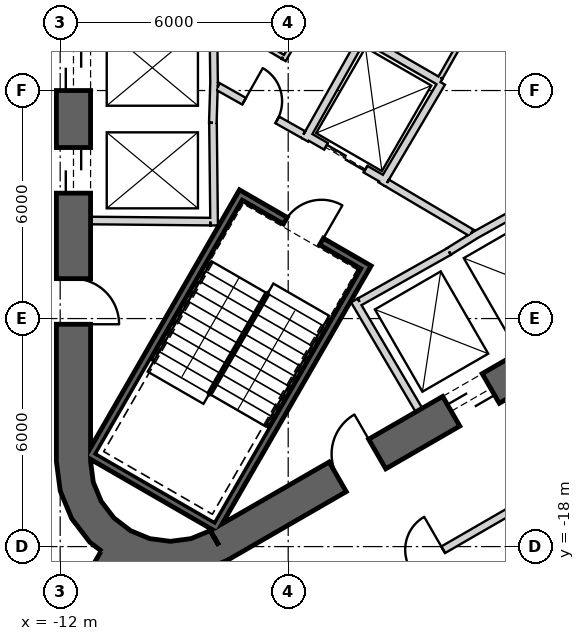
"""IFC4 building model, lengths in metres.
Left out: names, types, materials, properties, quantities, classifications, styles, units other than length and angle.
Written with IfcOpenShell. Run it as: python <this file> out.ifc"""

import sys

from ifc_helpers import new_model, si_unit, direction, frame, frame_2d, origin, place, context, subcontext, project, spatial, polyline, rectangle, outline, extrude, element, fill, save


model = new_model("IFC4")
c1 = context("Model", 3, precision=1e-05, world=origin(), true_north=direction((0.0, 1.0)))
c2 = subcontext(c1, "Body", "Model", "MODEL_VIEW")
j1 = project(units=[si_unit("LENGTHUNIT", "METRE"), si_unit("PLANEANGLEUNIT", "RADIAN")], contexts=[c1])
p1 = place(None, origin())
s1 = spatial("IfcSite", under=j1, at=p1, CompositionType="ELEMENT")
p2 = place(p1, origin())
s2 = spatial("IfcBuilding", under=s1, at=p2, CompositionType="ELEMENT")
p3 = place(p2, frame((0.0, 0.0, 119.3)))
s3 = spatial("IfcBuildingStorey", under=s2, at=p3, CompositionType="ELEMENT", Elevation=119.3)
p4 = place(p3, frame((-11.65, 15.762, 0.0), z_axis=(0.0, 0.0, 1.0), x_axis=(0.0, -1.0, 0.0)))
e1 = element("IfcWall", 1, at=p4, inside=s3, PredefinedType="SHEAR", context=c2, shape_type="SweptSolid", body=[
    extrude(rectangle(XDim=31.523, YDim=0.9, at=frame_2d((15.762, 0.0))), origin(), (0.0, 0.0, 1.0), 4.1),
])
p5 = place(p4, frame((7.062, 0.0, 0.0)))
e2 = element("IfcOpeningElement", 2, at=p5, cuts=e1, PredefinedType="OPENING", context=c2, shape_type="SweptSolid", body=[
    extrude(rectangle(XDim=1.2, YDim=2.4, at=frame_2d((0.6, 1.2))), frame((0.0, 0.46, 0.0), z_axis=(0.0, -1.0, 0.0), x_axis=(1.0, 0.0, 0.0)), (0.0, 0.0, 1.0), 0.92),
])
p6 = place(p4, frame((9.762, 0.0, 0.0)))
e3 = element("IfcOpeningElement", 3, at=p6, cuts=e1, PredefinedType="OPENING", context=c2, shape_type="SweptSolid", body=[
    extrude(rectangle(XDim=1.2, YDim=2.4, at=frame_2d((0.6, 1.2))), frame((0.0, 0.46, 0.0), z_axis=(0.0, -1.0, 0.0), x_axis=(1.0, 0.0, 0.0)), (0.0, 0.0, 1.0), 0.92),
])
p7 = place(p4, frame((12.462, 0.0, 0.0)))
e4 = element("IfcOpeningElement", 4, at=p7, cuts=e1, PredefinedType="OPENING", context=c2, shape_type="SweptSolid", body=[
    extrude(rectangle(XDim=1.2, YDim=2.4, at=frame_2d((0.6, 1.2))), frame((0.0, 0.46, 0.0), z_axis=(0.0, -1.0, 0.0), x_axis=(1.0, 0.0, 0.0)), (0.0, 0.0, 1.0), 0.92),
])
p8 = place(p4, frame((15.162, 0.0, 0.0)))
e5 = element("IfcOpeningElement", 5, at=p8, cuts=e1, PredefinedType="OPENING", context=c2, shape_type="SweptSolid", body=[
    extrude(rectangle(XDim=1.2, YDim=2.4, at=frame_2d((0.6, 1.2))), frame((0.0, 0.46, 0.0), z_axis=(0.0, -1.0, 0.0), x_axis=(1.0, 0.0, 0.0)), (0.0, 0.0, 1.0), 0.92),
])
p9 = place(p4, frame((17.862, 0.0, 0.0)))
e6 = element("IfcOpeningElement", 6, at=p9, cuts=e1, PredefinedType="OPENING", context=c2, shape_type="SweptSolid", body=[
    extrude(rectangle(XDim=1.2, YDim=2.4, at=frame_2d((0.6, 1.2))), frame((0.0, 0.46, 0.0), z_axis=(0.0, -1.0, 0.0), x_axis=(1.0, 0.0, 0.0)), (0.0, 0.0, 1.0), 0.92),
])
p10 = place(p4, frame((20.562, 0.0, 0.0)))
e7 = element("IfcOpeningElement", 7, at=p10, cuts=e1, PredefinedType="OPENING", context=c2, shape_type="SweptSolid", body=[
    extrude(rectangle(XDim=1.2, YDim=2.4, at=frame_2d((0.6, 1.2))), frame((0.0, 0.46, 0.0), z_axis=(0.0, -1.0, 0.0), x_axis=(1.0, 0.0, 0.0)), (0.0, 0.0, 1.0), 0.92),
])
p11 = place(p4, frame((23.262, 0.0, 0.0)))
e8 = element("IfcOpeningElement", 8, at=p11, cuts=e1, PredefinedType="OPENING", context=c2, shape_type="SweptSolid", body=[
    extrude(rectangle(XDim=1.2, YDim=2.4, at=frame_2d((0.6, 1.2))), frame((0.0, 0.46, 0.0), z_axis=(0.0, -1.0, 0.0), x_axis=(1.0, 0.0, 0.0)), (0.0, 0.0, 1.0), 0.92),
])
p12 = place(p4, frame((3.612, 0.0, 0.0)))
e9 = element("IfcOpeningElement", 9, at=p12, cuts=e1, PredefinedType="OPENING", context=c2, shape_type="SweptSolid", body=[
    extrude(rectangle(XDim=1.2, YDim=2.4, at=frame_2d((0.6, 1.2))), frame((0.0, 0.46, 0.0), z_axis=(0.0, -1.0, 0.0), x_axis=(1.0, 0.0, 0.0)), (0.0, 0.0, 1.0), 0.92),
])
p13 = place(p4, frame((26.712, 0.0, 0.0)))
e10 = element("IfcOpeningElement", 10, at=p13, cuts=e1, PredefinedType="OPENING", context=c2, shape_type="SweptSolid", body=[
    extrude(rectangle(XDim=1.2, YDim=2.4, at=frame_2d((0.6, 1.2))), frame((0.0, 0.46, 0.0), z_axis=(0.0, -1.0, 0.0), x_axis=(1.0, 0.0, 0.0)), (0.0, 0.0, 1.0), 0.92),
])
p14 = place(p3, frame((-7.825, -17.97, 0.0), z_axis=(0.0, 0.0, 1.0), x_axis=(0.866028369851, 0.499994862586, 0.0)))
e11 = element("IfcWall", 11, at=p14, inside=s3, PredefinedType="SHEAR", context=c2, shape_type="SweptSolid", body=[
    extrude(rectangle(XDim=31.523, YDim=0.9, at=frame_2d((15.762, 0.0))), origin(), (0.0, 0.0, 1.0), 4.1),
])
p15 = place(p14, frame((7.062, 0.0, 0.0)))
e12 = element("IfcOpeningElement", 12, at=p15, cuts=e11, PredefinedType="OPENING", context=c2, shape_type="SweptSolid", body=[
    extrude(rectangle(XDim=1.2, YDim=2.4, at=frame_2d((0.6, 1.2))), frame((0.0, 0.46, 0.0), z_axis=(0.0, -1.0, 0.0), x_axis=(1.0, 0.0, 0.0)), (0.0, 0.0, 1.0), 0.92),
])
p16 = place(p14, frame((9.762, 0.0, 0.0)))
e13 = element("IfcOpeningElement", 13, at=p16, cuts=e11, PredefinedType="OPENING", context=c2, shape_type="SweptSolid", body=[
    extrude(rectangle(XDim=1.2, YDim=2.4, at=frame_2d((0.6, 1.2))), frame((0.0, 0.46, 0.0), z_axis=(0.0, -1.0, 0.0), x_axis=(1.0, 0.0, 0.0)), (0.0, 0.0, 1.0), 0.92),
])
p17 = place(p14, frame((12.462, 0.0, 0.0)))
e14 = element("IfcOpeningElement", 14, at=p17, cuts=e11, PredefinedType="OPENING", context=c2, shape_type="SweptSolid", body=[
    extrude(rectangle(XDim=1.2, YDim=2.4, at=frame_2d((0.6, 1.2))), frame((0.0, 0.46, 0.0), z_axis=(0.0, -1.0, 0.0), x_axis=(1.0, 0.0, 0.0)), (0.0, 0.0, 1.0), 0.92),
])
p18 = place(p14, frame((15.162, 0.0, 0.0)))
e15 = element("IfcOpeningElement", 15, at=p18, cuts=e11, PredefinedType="OPENING", context=c2, shape_type="SweptSolid", body=[
    extrude(rectangle(XDim=1.2, YDim=2.4, at=frame_2d((0.6, 1.2))), frame((0.0, 0.46, 0.0), z_axis=(0.0, -1.0, 0.0), x_axis=(1.0, 0.0, 0.0)), (0.0, 0.0, 1.0), 0.92),
])
p19 = place(p14, frame((17.862, 0.0, 0.0)))
e16 = element("IfcOpeningElement", 16, at=p19, cuts=e11, PredefinedType="OPENING", context=c2, shape_type="SweptSolid", body=[
    extrude(rectangle(XDim=1.2, YDim=2.4, at=frame_2d((0.6, 1.2))), frame((0.0, 0.46, 0.0), z_axis=(0.0, -1.0, 0.0), x_axis=(1.0, 0.0, 0.0)), (0.0, 0.0, 1.0), 0.92),
])
p20 = place(p14, frame((20.562, 0.0, 0.0)))
e17 = element("IfcOpeningElement", 17, at=p20, cuts=e11, PredefinedType="OPENING", context=c2, shape_type="SweptSolid", body=[
    extrude(rectangle(XDim=1.2, YDim=2.4, at=frame_2d((0.6, 1.2))), frame((0.0, 0.46, 0.0), z_axis=(0.0, -1.0, 0.0), x_axis=(1.0, 0.0, 0.0)), (0.0, 0.0, 1.0), 0.92),
])
p21 = place(p14, frame((26.712, 0.0, 0.0)))
e18 = element("IfcOpeningElement", 18, at=p21, cuts=e11, PredefinedType="OPENING", context=c2, shape_type="SweptSolid", body=[
    extrude(rectangle(XDim=1.2, YDim=2.4, at=frame_2d((0.6, 1.2))), frame((0.0, 0.46, 0.0), z_axis=(0.0, -1.0, 0.0), x_axis=(1.0, 0.0, 0.0)), (0.0, 0.0, 1.0), 0.92),
])
p22 = place(p14, frame((3.612, 0.0, 0.0)))
e19 = element("IfcOpeningElement", 19, at=p22, cuts=e11, PredefinedType="OPENING", context=c2, shape_type="SweptSolid", body=[
    extrude(rectangle(XDim=1.2, YDim=2.4, at=frame_2d((0.6, 1.2))), frame((0.0, 0.46, 0.0), z_axis=(0.0, -1.0, 0.0), x_axis=(1.0, 0.0, 0.0)), (0.0, 0.0, 1.0), 0.92),
])
p23 = place(p3, origin())
e20 = element("IfcWall", 20, at=p23, inside=s3, PredefinedType="SHEAR", context=c2, shape_type="SweptSolid", body=[
    extrude(outline(polyline([(-12.1, -15.762), (-11.998, -16.538), (-11.698, -17.262), (-11.221, -17.883), (-10.6, -18.36), (-9.876, -18.659), (-9.1, -18.762), (-8.323, -18.659), (-7.6, -18.36), (-8.05, -17.58), (-8.556, -17.79), (-9.1, -17.862), (-9.644, -17.79), (-10.15, -17.58), (-10.585, -17.247), (-10.919, -16.812), (-11.128, -16.305), (-11.2, -15.762), (-12.1, -15.762)])), origin(), (0.0, 0.0, 1.0), 4.1),
])
p24 = place(p3, frame((-10.575, -18.316, 0.0), z_axis=(0.0, 0.0, 1.0), x_axis=(-0.500008359956, -0.866020577108, 0.0)))
e21 = element("IfcWall", 21, at=p24, inside=s3, PredefinedType="SHEAR", context=c2, shape_type="SweptSolid", body=[
    extrude(rectangle(XDim=12.812, YDim=0.8, at=frame_2d((6.406, 0.0))), origin(), (0.0, 0.0, 1.0), 4.1),
])
p25 = place(p24, frame((4.15, 0.0, 0.0)))
e22 = element("IfcOpeningElement", 22, at=p25, cuts=e21, PredefinedType="OPENING", context=c2, shape_type="SweptSolid", body=[
    extrude(rectangle(XDim=1.4, YDim=2.4, at=frame_2d((0.7, 1.2))), frame((0.0, 0.41, 0.0), z_axis=(0.0, -1.0, 0.0), x_axis=(1.0, 0.0, 0.0)), (0.0, 0.0, 1.0), 0.82),
])
p26 = place(p3, frame((-7.95, -5.772, 0.0), z_axis=(0.0, 0.0, 1.0), x_axis=(-0.030803413295, -0.999525462272, 0.0)))
e23 = element("IfcWall", 23, at=p26, inside=s3, PredefinedType="PLUMBINGWALL", context=c2, shape_type="SweptSolid", body=[
    extrude(rectangle(XDim=1.078, YDim=0.2, at=frame_2d((0.539, 0.0))), origin(), (0.0, 0.0, 1.0), 3.8),
])
p27 = place(p3, frame((-7.971, -4.05, 0.0), z_axis=(0.0, 0.0, 1.0), x_axis=(0.012042535896, -0.999927486035, 0.0)))
e24 = element("IfcWall", 24, at=p27, inside=s3, PredefinedType="PLUMBINGWALL", context=c2, shape_type="SweptSolid", body=[
    extrude(rectangle(XDim=1.845, YDim=0.2, at=frame_2d((0.922, 0.0))), origin(), (0.0, 0.0, 1.0), 3.8),
])
p28 = place(p3, frame((-7.979, -6.85, 0.0), z_axis=(0.0, 0.0, 1.0), x_axis=(0.011121475088, -0.999938154483, 0.0)))
e25 = element("IfcWall", 25, at=p28, inside=s3, PredefinedType="PLUMBINGWALL", context=c2, shape_type="SweptSolid", body=[
    extrude(rectangle(XDim=2.7, YDim=0.2, at=frame_2d((1.35, 0.0))), origin(), (0.0, 0.0, 1.0), 3.8),
])
p29 = place(p3, frame((-8.05, -9.449, 0.0), z_axis=(0.0, 0.0, 1.0), x_axis=(-0.999957467379, 0.009222983926, 0.0)))
e26 = element("IfcWall", 26, at=p29, inside=s3, PredefinedType="PLUMBINGWALL", context=c2, shape_type="SweptSolid", body=[
    extrude(rectangle(XDim=3.15, YDim=0.2, at=frame_2d((1.575, 0.0))), origin(), (0.0, 0.0, 1.0), 3.8),
])
p30 = place(p3, frame((-2.558, -14.409, 0.0), z_axis=(0.0, 0.0, 1.0), x_axis=(-0.507997497166, 0.861358544901, 0.0)))
e27 = element("IfcWall", 27, at=p30, inside=s3, PredefinedType="PLUMBINGWALL", context=c2, shape_type="SweptSolid", body=[
    extrude(rectangle(XDim=3.35, YDim=0.2, at=frame_2d((1.675, 0.0))), origin(), (0.0, 0.0, 1.0), 3.8),
])
p31 = place(p3, frame((-1.769, -10.237, 0.0), z_axis=(0.0, 0.0, 1.0), x_axis=(-0.871534483978, -0.490334215854, 0.0)))
e28 = element("IfcWall", 28, at=p31, inside=s3, PredefinedType="PLUMBINGWALL", context=c2, shape_type="SweptSolid", body=[
    extrude(rectangle(XDim=2.7, YDim=0.2, at=frame_2d((1.35, 0.0))), origin(), (0.0, 0.0, 1.0), 3.8),
])
p32 = place(p3, frame((-1.024, -9.771, 0.0), z_axis=(0.0, 0.0, 1.0), x_axis=(-0.850348075135, -0.526220629693, 0.0)))
e29 = element("IfcWall", 29, at=p32, inside=s3, PredefinedType="PLUMBINGWALL", context=c2, shape_type="SweptSolid", body=[
    extrude(rectangle(XDim=0.878, YDim=0.2, at=frame_2d((0.439, 0.0))), origin(), (0.0, 0.0, 1.0), 3.8),
])
p33 = place(p3, frame((-1.13, -9.831, 0.0), z_axis=(0.0, 0.0, 1.0), x_axis=(0.874269620932, 0.485440655401, 0.0)))
e30 = element("IfcWall", 30, at=p33, inside=s3, PredefinedType="PLUMBINGWALL", context=c2, shape_type="SweptSolid", body=[
    extrude(rectangle(XDim=1.845, YDim=0.2, at=frame_2d((0.922, 0.0))), origin(), (0.0, 0.0, 1.0), 3.8),
])
p34 = place(p3, frame((-3.905, -10.563, -0.3), z_axis=(0.0, 0.0, 1.0), x_axis=(-0.500012932018, -0.866017937352, 0.0)))
e31 = element("IfcWall", 31, at=p34, inside=s3, PredefinedType="SHEAR", context=c2, shape_type="SweptSolid", body=[
    extrude(rectangle(XDim=8.1, YDim=0.2, at=frame_2d((4.05, 0.0))), origin(), (0.0, 0.0, 1.0), 4.1),
])
p35 = place(p3, frame((-11.282, -15.541, -0.3), z_axis=(0.0, 0.0, 1.0), x_axis=(0.866000483506, -0.500043160704, 0.0)))
e32 = element("IfcWall", 32, at=p35, inside=s3, PredefinedType="SHEAR", context=c2, shape_type="SweptSolid", body=[
    extrude(rectangle(XDim=3.8, YDim=0.2, at=frame_2d((1.9, 0.0))), origin(), (0.0, 0.0, 1.0), 4.1),
])
p36 = place(p3, frame((-7.196, -8.663, -0.3), z_axis=(0.0, 0.0, 1.0), x_axis=(-0.499997992926, -0.866026562566, 0.0)))
e33 = element("IfcWall", 33, at=p36, inside=s3, PredefinedType="SHEAR", context=c2, shape_type="SweptSolid", body=[
    extrude(rectangle(XDim=7.9, YDim=0.2, at=frame_2d((3.95, 0.0))), origin(), (0.0, 0.0, 1.0), 4.1),
])
p37 = place(p3, frame((-4.041, -10.599, -0.3), z_axis=(0.0, 0.0, 1.0), x_axis=(-0.866047807691, 0.499961193289, 0.0)))
e34 = element("IfcWall", 34, at=p37, inside=s3, PredefinedType="SHEAR", context=c2, shape_type="SweptSolid", body=[
    extrude(rectangle(XDim=3.6, YDim=0.2, at=frame_2d((1.8, 0.0))), origin(), (0.0, 0.0, 1.0), 4.1),
])
p38 = place(p37, frame((1.25, 0.0, 0.3)))
e35 = element("IfcOpeningElement", 35, at=p38, cuts=e34, PredefinedType="OPENING", context=c2, shape_type="SweptSolid", body=[
    extrude(rectangle(XDim=1.1, YDim=2.1, at=frame_2d((0.55, 1.05))), frame((0.0, 0.11, 0.0), z_axis=(0.0, -1.0, 0.0), x_axis=(1.0, 0.0, 0.0)), (0.0, 0.0, 1.0), 0.22),
])
p39 = place(p3, frame((-3.446, -8.368, 0.0), z_axis=(0.0, 0.0, 1.0), x_axis=(-0.866024647952, 0.500001309137, 0.0)))
e36 = element("IfcWall", 36, at=p39, inside=s3, PredefinedType="PLUMBINGWALL", context=c2, shape_type="SweptSolid", body=[
    extrude(rectangle(XDim=2.4, YDim=0.2, at=frame_2d((1.2, 0.0))), origin(), (0.0, 0.0, 1.0), 3.8),
])
p40 = place(p39, frame((0.6, 0.0, 0.0)))
e37 = element("IfcOpeningElement", 37, at=p40, cuts=e36, PredefinedType="OPENING", context=c2, shape_type="SweptSolid", body=[
    extrude(rectangle(XDim=1.2, YDim=2.4, at=frame_2d((0.6, 1.2))), frame((0.0, 0.11, 0.0), z_axis=(0.0, -1.0, 0.0), x_axis=(1.0, 0.0, 0.0)), (0.0, 0.0, 1.0), 0.22),
])
p41 = place(p3, frame((-1.961, -5.796, 0.0), z_axis=(0.0, 0.0, 1.0), x_axis=(-0.508647062354, -0.860975125052, 0.0)))
e38 = element("IfcWall", 38, at=p41, inside=s3, PredefinedType="PLUMBINGWALL", context=c2, shape_type="SweptSolid", body=[
    extrude(rectangle(XDim=3.1, YDim=0.2, at=frame_2d((1.55, 0.0))), origin(), (0.0, 0.0, 1.0), 3.8),
])
p42 = place(p3, frame((-3.99, -4.509, 0.0), z_axis=(0.0, 0.0, 1.0), x_axis=(-0.491358283181, -0.870957540612, 0.0)))
e39 = element("IfcWall", 39, at=p42, inside=s3, PredefinedType="PLUMBINGWALL", context=c2, shape_type="SweptSolid", body=[
    extrude(rectangle(XDim=3.2, YDim=0.2, at=frame_2d((1.6, 0.0))), origin(), (0.0, 0.0, 1.0), 3.8),
])
p43 = place(p3, frame((-3.953, -4.646, 0.0), z_axis=(0.0, 0.0, 1.0), x_axis=(0.866065302921, -0.4999308863, 0.0)))
e40 = element("IfcWall", 40, at=p43, inside=s3, PredefinedType="PLUMBINGWALL", context=c2, shape_type="SweptSolid", body=[
    extrude(rectangle(XDim=2.264, YDim=0.2, at=frame_2d((1.132, 0.0))), origin(), (0.0, 0.0, 1.0), 3.8),
])
p44 = place(p3, frame((-3.401, -8.43, 0.0), z_axis=(0.0, 0.0, 1.0), x_axis=(0.860615607571, -0.509255118781, 0.0)))
e41 = element("IfcWall", 41, at=p44, inside=s3, PredefinedType="PARTITIONING", context=c2, shape_type="SweptSolid", body=[
    extrude(rectangle(XDim=2.581, YDim=0.2, at=frame_2d((1.29, 0.0))), origin(), (0.0, 0.0, 1.0), 3.8),
])
p45 = place(p3, frame((-7.849, -5.894, 0.0), z_axis=(0.0, 0.0, 1.0), x_axis=(0.871363259478, -0.490638431059, 0.0)))
e42 = element("IfcWall", 42, at=p45, inside=s3, PredefinedType="PARTITIONING", context=c2, shape_type="SweptSolid", body=[
    extrude(rectangle(XDim=2.581, YDim=0.2, at=frame_2d((1.291, 0.0))), origin(), (0.0, 0.0, 1.0), 3.8),
])
p46 = place(p45, frame((0.791, 0.0, 0.0)))
e43 = element("IfcOpeningElement", 43, at=p46, cuts=e42, PredefinedType="OPENING", context=c2, shape_type="SweptSolid", body=[
    extrude(rectangle(XDim=1.0, YDim=2.1, at=frame_2d((0.5, 1.05))), frame((0.0, 0.11, 0.0), z_axis=(0.0, -1.0, 0.0), x_axis=(1.0, 0.0, 0.0)), (0.0, 0.0, 1.0), 0.22),
])
p47 = place(p3, frame((0.224, -1.761, 0.0), z_axis=(0.0, 0.0, 1.0), x_axis=(-0.494327216836, -0.869275907118, 0.0)))
e44 = element("IfcWall", 44, at=p47, inside=s3, PredefinedType="PARTITIONING", context=c2, shape_type="SweptSolid", body=[
    extrude(rectangle(XDim=4.487, YDim=0.12, at=frame_2d((2.244, 0.0))), origin(), (0.0, 0.0, 1.0), 3.8),
])
p48 = place(p47, frame((1.895, 0.0, 0.0)))
e45 = element("IfcOpeningElement", 45, at=p48, cuts=e44, PredefinedType="OPENING", context=c2, shape_type="SweptSolid", body=[
    extrude(rectangle(XDim=0.8, YDim=2.1, at=frame_2d((0.4, 1.05))), frame((0.0, 0.07, 0.0), z_axis=(0.0, -1.0, 0.0), x_axis=(1.0, 0.0, 0.0)), (0.0, 0.0, 1.0), 0.14),
])
p49 = place(p3, frame((-6.118, -5.197, 0.0), z_axis=(0.0, 0.0, 1.0), x_axis=(0.499990139034, 0.866031096941, 0.0)))
e46 = element("IfcWall", 46, at=p49, inside=s3, PredefinedType="PARTITIONING", context=c2, shape_type="SweptSolid", body=[
    extrude(rectangle(XDim=3.0, YDim=0.12, at=frame_2d((1.5, 0.0))), origin(), (0.0, 0.0, 1.0), 3.8),
])
p50 = place(p3, frame((-7.95, -4.041, 0.0), z_axis=(0.0, 0.0, 1.0), x_axis=(0.860112457103, -0.510104461004, 0.0)))
e47 = element("IfcWall", 47, at=p50, inside=s3, PredefinedType="PARTITIONING", context=c2, shape_type="SweptSolid", body=[
    extrude(rectangle(XDim=2.104, YDim=0.12, at=frame_2d((1.052, 0.0))), origin(), (0.0, 0.0, 1.0), 3.8),
])
p51 = place(p3, frame((-6.852, -20.93, 0.0), z_axis=(0.0, 0.0, 1.0), x_axis=(0.866023703603, 0.500002944789, 0.0)))
e48 = element("IfcWall", 48, at=p51, inside=s3, PredefinedType="PARTITIONING", context=c2, shape_type="SweptSolid", body=[
    extrude(rectangle(XDim=32.599, YDim=0.2, at=frame_2d((16.299, 0.0))), origin(), (0.0, 0.0, 1.0), 2.98),
])
p52 = place(p51, frame((27.463, 0.0, 0.0)))
e49 = element("IfcOpeningElement", 49, at=p52, cuts=e48, PredefinedType="OPENING", context=c2, shape_type="SweptSolid", body=[
    extrude(rectangle(XDim=1.0, YDim=2.1, at=frame_2d((0.5, 1.05))), frame((0.0, 0.11, 0.0), z_axis=(0.0, -1.0, 0.0), x_axis=(1.0, 0.0, 0.0)), (0.0, 0.0, 1.0), 0.22),
])
p53 = place(p51, frame((16.307, 0.0, 0.0)))
e50 = element("IfcOpeningElement", 50, at=p53, cuts=e48, PredefinedType="OPENING", context=c2, shape_type="SweptSolid", body=[
    extrude(rectangle(XDim=1.0, YDim=2.1, at=frame_2d((0.5, 1.05))), frame((0.0, 0.11, 0.0), z_axis=(0.0, -1.0, 0.0), x_axis=(1.0, 0.0, 0.0)), (0.0, 0.0, 1.0), 0.22),
])
p54 = place(p51, frame((4.694, 0.0, 0.0)))
e51 = element("IfcOpeningElement", 51, at=p54, cuts=e48, PredefinedType="OPENING", context=c2, shape_type="SweptSolid", body=[
    extrude(rectangle(XDim=1.0, YDim=2.1, at=frame_2d((0.5, 1.05))), frame((0.0, 0.11, 0.0), z_axis=(0.0, -1.0, 0.0), x_axis=(1.0, 0.0, 0.0)), (0.0, 0.0, 1.0), 0.22),
])
p55 = place(p38, origin())
e52 = element("IfcDoor", 52, at=p55, inside=s3, OperationType="SINGLE_SWING_RIGHT", PredefinedType="USERDEFINED", context=c2, shape_type="SweptSolid", body=[
    extrude(rectangle(XDim=1.1, YDim=2.1, at=frame_2d((0.55, 1.05))), frame((0.0, 0.025, 0.0), z_axis=(0.0, -1.0, 0.0), x_axis=(1.0, 0.0, 0.0)), (0.0, 0.0, 1.0), 0.05),
])
fill(e35, e52)
p56 = place(p46, origin())
e53 = element("IfcDoor", 53, at=p56, inside=s3, OperationType="SINGLE_SWING_RIGHT", PredefinedType="USERDEFINED", context=c2, shape_type="SweptSolid", body=[
    extrude(rectangle(XDim=1.0, YDim=2.1, at=frame_2d((0.5, 1.05))), frame((0.0, 0.025, 0.0), z_axis=(0.0, -1.0, 0.0), x_axis=(1.0, 0.0, 0.0)), (0.0, 0.0, 1.0), 0.05),
])
fill(e43, e53)
p57 = place(p40, origin())
e54 = element("IfcDoor", 54, at=p57, inside=s3, OperationType="SLIDING_TO_LEFT", PredefinedType="USERDEFINED", context=c2, shape_type="SweptSolid", body=[
    extrude(rectangle(XDim=1.2, YDim=2.4, at=frame_2d((0.6, 1.2))), frame((0.0, 0.025, 0.0), z_axis=(0.0, -1.0, 0.0), x_axis=(1.0, 0.0, 0.0)), (0.0, 0.0, 1.0), 0.05),
])
fill(e37, e54)
p58 = place(p54, origin())
e55 = element("IfcDoor", 55, at=p58, inside=s3, OperationType="SINGLE_SWING_LEFT", PredefinedType="USERDEFINED", context=c2, shape_type="SweptSolid", body=[
    extrude(rectangle(XDim=1.0, YDim=2.1, at=frame_2d((0.5, 1.05))), frame((0.0, 0.025, 0.0), z_axis=(0.0, -1.0, 0.0), x_axis=(1.0, 0.0, 0.0)), (0.0, 0.0, 1.0), 0.05),
])
fill(e51, e55)
p59 = place(p10, origin())
e56 = element("IfcDoor", 56, at=p59, inside=s3, OperationType="SLIDING_TO_LEFT", PredefinedType="USERDEFINED", context=c2, shape_type="SweptSolid", body=[
    extrude(rectangle(XDim=1.2, YDim=2.4, at=frame_2d((0.6, 1.2))), frame((0.0, 0.025, 0.0), z_axis=(0.0, -1.0, 0.0), x_axis=(1.0, 0.0, 0.0)), (0.0, 0.0, 1.0), 0.05),
])
fill(e7, e56)
p60 = place(p11, origin())
e57 = element("IfcDoor", 57, at=p60, inside=s3, OperationType="SLIDING_TO_LEFT", PredefinedType="USERDEFINED", context=c2, shape_type="SweptSolid", body=[
    extrude(rectangle(XDim=1.2, YDim=2.4, at=frame_2d((0.6, 1.2))), frame((0.0, 0.025, 0.0), z_axis=(0.0, -1.0, 0.0), x_axis=(1.0, 0.0, 0.0)), (0.0, 0.0, 1.0), 0.05),
])
fill(e8, e57)
p61 = place(p15, origin())
e58 = element("IfcDoor", 58, at=p61, inside=s3, OperationType="SLIDING_TO_LEFT", PredefinedType="USERDEFINED", context=c2, shape_type="SweptSolid", body=[
    extrude(rectangle(XDim=1.2, YDim=2.4, at=frame_2d((0.6, 1.2))), frame((0.0, 0.025, 0.0), z_axis=(0.0, -1.0, 0.0), x_axis=(1.0, 0.0, 0.0)), (0.0, 0.0, 1.0), 0.05),
])
fill(e12, e58)
p62 = place(p13, origin())
e59 = element("IfcDoor", 59, at=p62, inside=s3, OperationType="SINGLE_SWING_RIGHT", PredefinedType="USERDEFINED", context=c2, shape_type="SweptSolid", body=[
    extrude(rectangle(XDim=1.2, YDim=2.4, at=frame_2d((0.6, 1.2))), frame((0.0, 0.025, 0.0), z_axis=(0.0, -1.0, 0.0), x_axis=(1.0, 0.0, 0.0)), (0.0, 0.0, 1.0), 0.05),
])
fill(e10, e59)
p63 = place(p22, origin())
e60 = element("IfcDoor", 60, at=p63, inside=s3, OperationType="SINGLE_SWING_RIGHT", PredefinedType="USERDEFINED", context=c2, shape_type="SweptSolid", body=[
    extrude(rectangle(XDim=1.2, YDim=2.4, at=frame_2d((0.6, 1.2))), frame((0.0, 0.025, 0.0), z_axis=(0.0, -1.0, 0.0), x_axis=(1.0, 0.0, 0.0)), (0.0, 0.0, 1.0), 0.05),
])
fill(e19, e60)
save(model, sys.argv[1])
